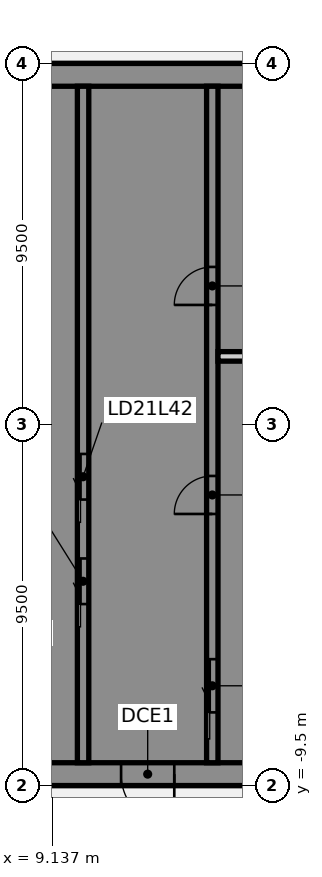
"""IFC4 building model, lengths in metres.
Left out: names, types, materials, properties, quantities, classifications, styles, units other than length and angle.
Written with IfcOpenShell. Run it as: python <this file> out.ifc"""

import sys

from ifc_helpers import new_model, si_unit, direction, frame, frame_2d, origin, place, context, subcontext, project, spatial, polyline, rectangle, outline, extrude, element, fill, save


model = new_model("IFC4")
c1 = context("Model", 3, precision=1e-05, world=origin(), true_north=direction((0.0, 1.0)))
c2 = subcontext(c1, "Body", "Model", "MODEL_VIEW")
j1 = project(units=[si_unit("LENGTHUNIT", "METRE"), si_unit("PLANEANGLEUNIT", "RADIAN")], contexts=[c1])
p1 = place(None, origin())
s1 = spatial("IfcSite", under=j1, at=p1, CompositionType="ELEMENT")
p2 = place(p1, origin())
s2 = spatial("IfcBuilding", under=s1, at=p2, CompositionType="ELEMENT")
p3 = place(p2, frame((0.0, 0.0, 170.5)))
s3 = spatial("IfcBuildingStorey", under=s2, at=p3, CompositionType="ELEMENT", Elevation=170.5)
p4 = place(p3, frame((16.5, -9.2, 0.0), z_axis=(0.0, 0.0, 1.0), x_axis=(-1.0, 0.0, 0.0)))
e1 = element("IfcWall", 1, at=p4, inside=s3, PredefinedType="SHEAR", context=c2, shape_type="SweptSolid", body=[
    extrude(rectangle(XDim=13.0, YDim=0.6, at=frame_2d((6.5, 0.0))), origin(), (0.0, 0.0, 1.0), 3.61),
])
p5 = place(p4, frame((4.15, 0.0, 0.0)))
e2 = element("IfcOpeningElement", 2, at=p5, cuts=e1, PredefinedType="OPENING", context=c2, shape_type="SweptSolid", body=[
    extrude(rectangle(XDim=1.4, YDim=2.1, at=frame_2d((0.7, 1.05))), frame((0.0, 0.31, 0.0), z_axis=(0.0, -1.0, 0.0), x_axis=(1.0, 0.0, 0.0)), (0.0, 0.0, 1.0), 0.62),
])
p6 = place(p4, frame((10.125, 0.0, 0.0)))
e3 = element("IfcOpeningElement", 3, at=p6, cuts=e1, PredefinedType="OPENING", context=c2, shape_type="SweptSolid", body=[
    extrude(rectangle(XDim=1.4, YDim=2.1, at=frame_2d((0.7, 1.05))), frame((0.0, 0.31, 0.0), z_axis=(0.0, -1.0, 0.0), x_axis=(1.0, 0.0, 0.0)), (0.0, 0.0, 1.0), 0.62),
])
p7 = place(p3, origin())
e4 = element("IfcWall", 4, at=p7, inside=s3, PredefinedType="SHEAR", context=c2, shape_type="SweptSolid", body=[
    extrude(outline(polyline([(13.5, -8.125), (13.5, -8.9), (15.9, -8.9), (16.5, -8.9), (16.5, 8.9), (15.9, 8.9), (13.5, 8.9), (13.5, 8.125), (15.9, 8.125), (15.9, 5.625), (13.5, 5.625), (13.5, 5.375), (15.9, 5.375), (15.9, -5.375), (13.5, -5.375), (13.5, -5.625), (15.9, -5.625), (15.9, -8.125), (13.5, -8.125)])), origin(), (0.0, 0.0, 1.0), 3.61),
])
p8 = place(p3, frame((16.5, 9.2, 0.0), z_axis=(0.0, 0.0, 1.0), x_axis=(-1.0, 0.0, 0.0)))
e5 = element("IfcWall", 5, at=p8, inside=s3, PredefinedType="SHEAR", context=c2, shape_type="SweptSolid", body=[
    extrude(rectangle(XDim=13.0, YDim=0.6, at=frame_2d((6.5, 0.0))), origin(), (0.0, 0.0, 1.0), 3.61),
])
p9 = place(p3, origin())
e6 = element("IfcWall", 6, at=p9, inside=s3, PredefinedType="SHEAR", context=c2, shape_type="SweptSolid", body=[
    extrude(outline(polyline([(9.8, -5.375), (7.5, -5.375), (7.5, -2.875), (9.8, -2.875), (9.8, -2.625), (7.5, -2.625), (7.5, -0.125), (9.8, -0.125), (9.8, 0.125), (7.5, 0.125), (7.5, 2.625), (9.8, 2.625), (9.8, 2.875), (7.5, 2.875), (7.5, 5.375), (9.8, 5.375), (9.8, 5.625), (7.5, 5.625), (7.5, 8.125), (9.8, 8.125), (9.8, 8.9), (7.5, 8.9), (7.2, 8.9), (7.2, -5.625), (7.5, -5.625), (9.8, -5.625), (9.8, -5.375)])), origin(), (0.0, 0.0, 1.0), 3.61),
])
p10 = place(p3, origin())
e7 = element("IfcWall", 7, at=p10, inside=s3, PredefinedType="SHEAR", context=c2, shape_type="SweptSolid", body=[
    extrude(outline(polyline([(7.5, -8.125), (7.5, -8.9), (9.8, -8.9), (9.8, -8.125), (9.8, -5.625), (9.55, -5.625), (9.55, -8.125), (7.5, -8.125)])), origin(), (0.0, 0.0, 1.0), 3.61),
])
p11 = place(p3, frame((13.35, -8.9, 0.0), z_axis=(0.0, 0.0, 1.0), x_axis=(0.0, 1.0, 0.0)))
e8 = element("IfcWall", 8, at=p11, inside=s3, PredefinedType="SHEAR", context=c2, shape_type="SweptSolid", body=[
    extrude(rectangle(XDim=17.8, YDim=0.3, at=frame_2d((8.9, 0.0))), origin(), (0.0, 0.0, 1.0), 3.61),
])
p12 = place(p11, frame((1.325, 0.0, 0.0)))
e9 = element("IfcOpeningElement", 9, at=p12, cuts=e8, PredefinedType="OPENING", context=c2, shape_type="SweptSolid", body=[
    extrude(rectangle(XDim=1.4, YDim=2.1, at=frame_2d((0.7, 1.05))), frame((0.0, 0.16, 0.0), z_axis=(0.0, -1.0, 0.0), x_axis=(1.0, 0.0, 0.0)), (0.0, 0.0, 1.0), 0.32),
])
p13 = place(p11, frame((6.546, 0.0, 0.0)))
e10 = element("IfcOpeningElement", 10, at=p13, cuts=e8, PredefinedType="OPENING", context=c2, shape_type="SweptSolid", body=[
    extrude(rectangle(XDim=1.0, YDim=2.1, at=frame_2d((0.5, 1.05))), frame((0.0, 0.16, 0.0), z_axis=(0.0, -1.0, 0.0), x_axis=(1.0, 0.0, 0.0)), (0.0, 0.0, 1.0), 0.32),
])
p14 = place(p11, frame((12.046, 0.0, 0.0)))
e11 = element("IfcOpeningElement", 11, at=p14, cuts=e8, PredefinedType="OPENING", context=c2, shape_type="SweptSolid", body=[
    extrude(rectangle(XDim=1.0, YDim=2.1, at=frame_2d((0.5, 1.05))), frame((0.0, 0.16, 0.0), z_axis=(0.0, -1.0, 0.0), x_axis=(1.0, 0.0, 0.0)), (0.0, 0.0, 1.0), 0.32),
])
p15 = place(p3, frame((9.95, -8.9, 0.0), z_axis=(0.0, 0.0, 1.0), x_axis=(0.0, 1.0, 0.0)))
e12 = element("IfcWall", 12, at=p15, inside=s3, PredefinedType="SHEAR", context=c2, shape_type="SweptSolid", body=[
    extrude(rectangle(XDim=17.8, YDim=0.3, at=frame_2d((8.9, 0.0))), origin(), (0.0, 0.0, 1.0), 3.61),
])
p16 = place(p15, frame((4.175, 0.0, 0.0)))
e13 = element("IfcOpeningElement", 13, at=p16, cuts=e12, PredefinedType="OPENING", context=c2, shape_type="SweptSolid", body=[
    extrude(rectangle(XDim=1.2, YDim=2.1, at=frame_2d((0.6, 1.05))), frame((0.0, 0.16, 0.0), z_axis=(0.0, -1.0, 0.0), x_axis=(1.0, 0.0, 0.0)), (0.0, 0.0, 1.0), 0.32),
])
p17 = place(p15, frame((6.925, 0.0, 0.0)))
e14 = element("IfcOpeningElement", 14, at=p17, cuts=e12, PredefinedType="OPENING", context=c2, shape_type="SweptSolid", body=[
    extrude(rectangle(XDim=1.2, YDim=2.1, at=frame_2d((0.6, 1.05))), frame((0.0, 0.16, 0.0), z_axis=(0.0, -1.0, 0.0), x_axis=(1.0, 0.0, 0.0)), (0.0, 0.0, 1.0), 0.32),
])
p18 = place(p3, frame((15.8, 1.792, 0.0), z_axis=(0.0, 0.0, 1.0), x_axis=(-1.0, 0.0, 0.0)))
e15 = element("IfcWall", 15, at=p18, inside=s3, PredefinedType="PARTITIONING", context=c2, shape_type="SweptSolid", body=[
    extrude(rectangle(XDim=2.3, YDim=0.25, at=frame_2d((1.15, 0.0))), origin(), (0.0, 0.0, 1.0), 3.61),
])
p19 = place(p5, origin())
e16 = element("IfcDoor", 16, at=p19, inside=s3, OperationType="SINGLE_SWING_LEFT", PredefinedType="DOOR", context=c2, shape_type="SweptSolid", body=[
    extrude(rectangle(XDim=1.4, YDim=2.1, at=frame_2d((0.7, 1.05))), frame((0.0, 0.025, 0.0), z_axis=(0.0, -1.0, 0.0), x_axis=(1.0, 0.0, 0.0)), (0.0, 0.0, 1.0), 0.05),
])
fill(e2, e16)
p20 = place(p12, origin())
e17 = element("IfcDoor", 17, at=p20, inside=s3, OperationType="SLIDING_TO_LEFT", PredefinedType="DOOR", context=c2, shape_type="SweptSolid", body=[
    extrude(rectangle(XDim=1.4, YDim=2.1, at=frame_2d((0.7, 1.05))), frame((0.0, 0.025, 0.0), z_axis=(0.0, -1.0, 0.0), x_axis=(1.0, 0.0, 0.0)), (0.0, 0.0, 1.0), 0.05),
])
fill(e9, e17)
p21 = place(p16, origin())
e18 = element("IfcDoor", 18, at=p21, inside=s3, OperationType="SLIDING_TO_LEFT", PredefinedType="DOOR", context=c2, shape_type="SweptSolid", body=[
    extrude(rectangle(XDim=1.2, YDim=2.1, at=frame_2d((0.6, 1.05))), frame((0.0, 0.025, 0.0), z_axis=(0.0, -1.0, 0.0), x_axis=(1.0, 0.0, 0.0)), (0.0, 0.0, 1.0), 0.05),
])
fill(e13, e18)
p22 = place(p17, origin())
e19 = element("IfcDoor", 19, at=p22, inside=s3, OperationType="SLIDING_TO_LEFT", PredefinedType="DOOR", context=c2, shape_type="SweptSolid", body=[
    extrude(rectangle(XDim=1.2, YDim=2.1, at=frame_2d((0.6, 1.05))), frame((0.0, 0.025, 0.0), z_axis=(0.0, -1.0, 0.0), x_axis=(1.0, 0.0, 0.0)), (0.0, 0.0, 1.0), 0.05),
])
fill(e14, e19)
p23 = place(p13, origin())
e20 = element("IfcDoor", 20, at=p23, inside=s3, OperationType="SINGLE_SWING_LEFT", PredefinedType="DOOR", context=c2, shape_type="SweptSolid", body=[
    extrude(rectangle(XDim=1.0, YDim=2.1, at=frame_2d((0.5, 1.05))), frame((0.0, 0.025, 0.0), z_axis=(0.0, -1.0, 0.0), x_axis=(1.0, 0.0, 0.0)), (0.0, 0.0, 1.0), 0.05),
])
fill(e10, e20)
p24 = place(p14, origin())
e21 = element("IfcDoor", 21, at=p24, inside=s3, OperationType="SINGLE_SWING_LEFT", PredefinedType="DOOR", context=c2, shape_type="SweptSolid", body=[
    extrude(rectangle(XDim=1.0, YDim=2.1, at=frame_2d((0.5, 1.05))), frame((0.0, 0.025, 0.0), z_axis=(0.0, -1.0, 0.0), x_axis=(1.0, 0.0, 0.0)), (0.0, 0.0, 1.0), 0.05),
])
fill(e11, e21)
save(model, sys.argv[1])
